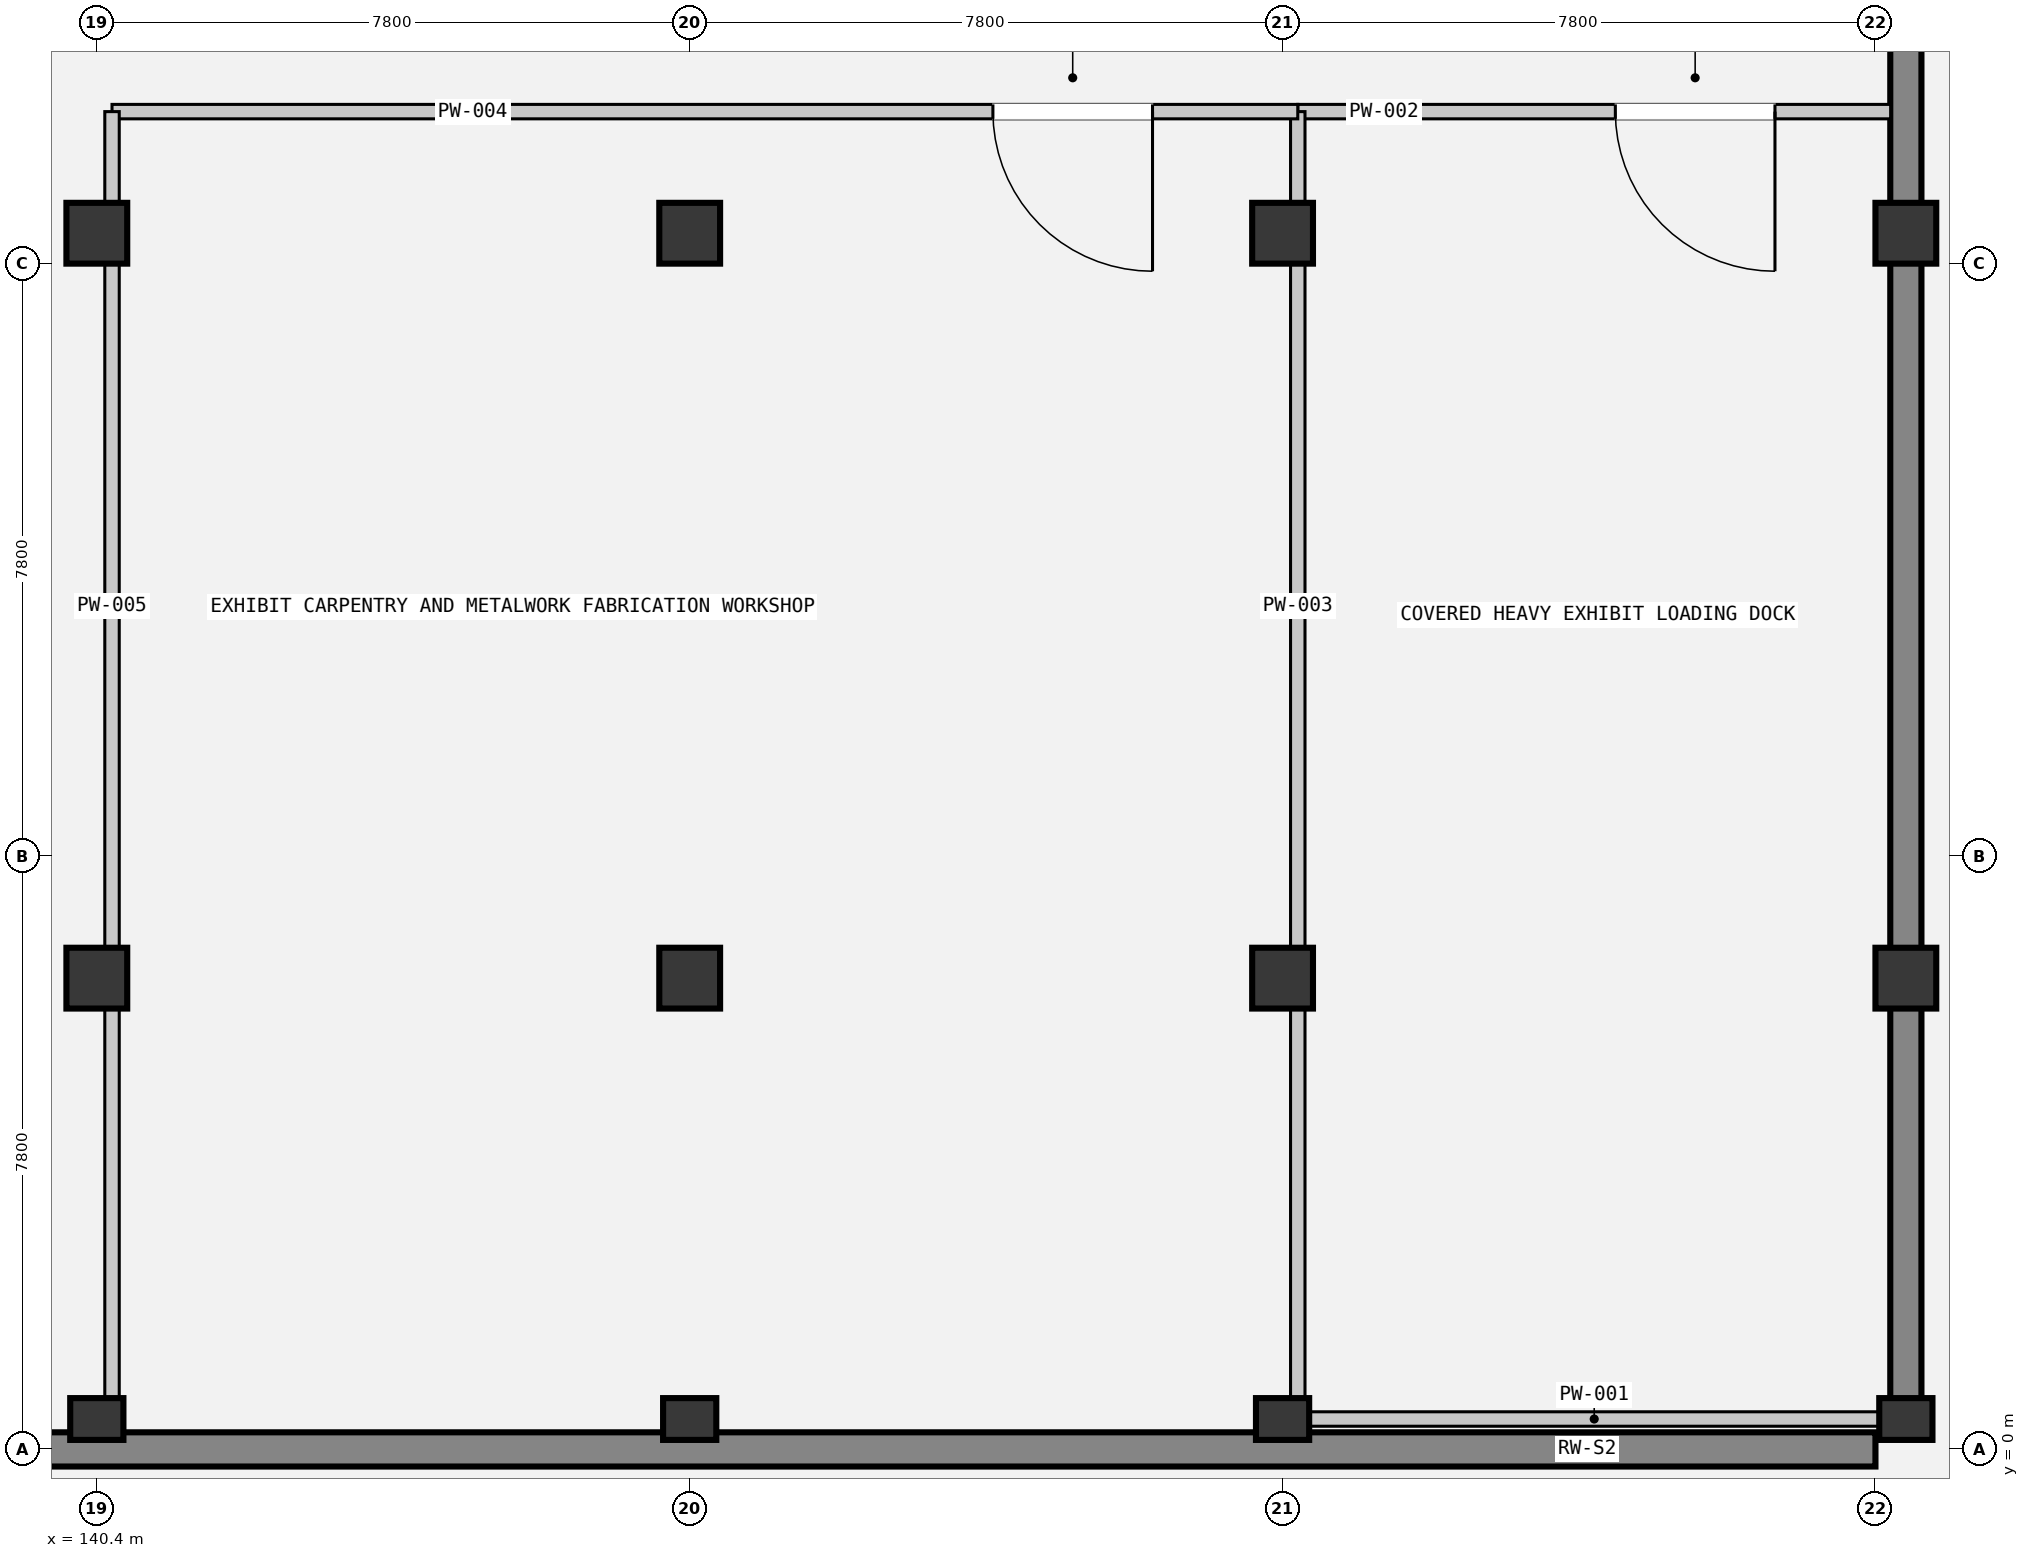
"""IFC4 building model, lengths in metres.
Left out: names, types, materials, properties, quantities, classifications, styles, units other than length and angle.
Written with IfcOpenShell. Run it as: python <this file> out.ifc"""

import sys

from ifc_helpers import new_model, si_unit, direction, frame, frame_2d, origin, origin_2d, place, context, subcontext, project, spatial, rectangle, extrude, element, fill, save


model = new_model("IFC4")
c1 = context("Model", 3, precision=1e-05, world=origin(), true_north=direction((0.0, 1.0)))
c2 = subcontext(c1, "Body", "Model", "MODEL_VIEW")
j1 = project(units=[si_unit("LENGTHUNIT", "METRE"), si_unit("PLANEANGLEUNIT", "RADIAN")], contexts=[c1])
p1 = place(None, origin())
s1 = spatial("IfcSite", under=j1, at=p1, CompositionType="ELEMENT")
p2 = place(p1, origin())
s2 = spatial("IfcBuilding", under=s1, at=p2, CompositionType="ELEMENT")
p3 = place(p2, frame((0.0, 0.0, -4.8)))
s3 = spatial("IfcBuildingStorey", under=s2, at=p3, CompositionType="ELEMENT", Elevation=-4.8)
p4 = place(p3, frame((140.4, 0.4, 0.0), z_axis=(0.0, 0.0, 1.0), x_axis=(1.0, 0.0, 0.0)))
e1 = element("IfcColumn", 1, at=p4, inside=s3, PredefinedType="COLUMN", context=c2, shape_type="SweptSolid", body=[
    extrude(rectangle(XDim=0.7, YDim=0.55, at=origin_2d()), origin(), (0.0, 0.0, 1.0), 4.8),
])
for number, where, z_axis, x_axis in (
    (2, (140.4, 6.2, 0.0), (0.0, 0.0, 1.0), (1.0, 0.0, 0.0)),
    (3, (140.4, 16.0, 0.0), (0.0, 0.0, 1.0), (1.0, 0.0, 0.0)),
):
    element("IfcColumn", number, at=place(p3, frame(where, z_axis=z_axis, x_axis=x_axis)), inside=s3, PredefinedType="COLUMN", context=c2, shape_type="SweptSolid", body=[
        extrude(rectangle(XDim=0.8, YDim=0.8, at=origin_2d()), origin(), (0.0, 0.0, 1.0), 4.8),
    ])
p5 = place(p3, frame((148.2, 0.4, 0.0), z_axis=(0.0, 0.0, 1.0), x_axis=(1.0, 0.0, 0.0)))
e4 = element("IfcColumn", 4, at=p5, inside=s3, PredefinedType="COLUMN", context=c2, shape_type="SweptSolid", body=[
    extrude(rectangle(XDim=0.7, YDim=0.55, at=origin_2d()), origin(), (0.0, 0.0, 1.0), 4.8),
])
for number, where, z_axis, x_axis in (
    (5, (148.2, 6.2, 0.0), (0.0, 0.0, 1.0), (1.0, 0.0, 0.0)),
    (6, (148.2, 16.0, 0.0), (0.0, 0.0, 1.0), (1.0, 0.0, 0.0)),
):
    element("IfcColumn", number, at=place(p3, frame(where, z_axis=z_axis, x_axis=x_axis)), inside=s3, PredefinedType="COLUMN", context=c2, shape_type="SweptSolid", body=[
        extrude(rectangle(XDim=0.8, YDim=0.8, at=origin_2d()), origin(), (0.0, 0.0, 1.0), 4.8),
    ])
p6 = place(p3, frame((156.0, 0.4, 0.0), z_axis=(0.0, 0.0, 1.0), x_axis=(1.0, 0.0, 0.0)))
e7 = element("IfcColumn", 7, at=p6, inside=s3, PredefinedType="COLUMN", context=c2, shape_type="SweptSolid", body=[
    extrude(rectangle(XDim=0.7, YDim=0.55, at=origin_2d()), origin(), (0.0, 0.0, 1.0), 4.8),
])
for number, where, z_axis, x_axis in (
    (8, (156.0, 6.2, 0.0), (0.0, 0.0, 1.0), (1.0, 0.0, 0.0)),
    (9, (156.0, 16.0, 0.0), (0.0, 0.0, 1.0), (1.0, 0.0, 0.0)),
):
    element("IfcColumn", number, at=place(p3, frame(where, z_axis=z_axis, x_axis=x_axis)), inside=s3, PredefinedType="COLUMN", context=c2, shape_type="SweptSolid", body=[
        extrude(rectangle(XDim=0.8, YDim=0.8, at=origin_2d()), origin(), (0.0, 0.0, 1.0), 4.8),
    ])
p7 = place(p3, frame((164.2, 0.4, 0.0), z_axis=(0.0, 0.0, 1.0), x_axis=(1.0, 0.0, 0.0)))
e10 = element("IfcColumn", 10, at=p7, inside=s3, PredefinedType="COLUMN", context=c2, shape_type="SweptSolid", body=[
    extrude(rectangle(XDim=0.7, YDim=0.55, at=origin_2d()), origin(), (0.0, 0.0, 1.0), 4.8),
])
for number, where, z_axis, x_axis in (
    (11, (164.2, 6.2, 0.0), (0.0, 0.0, 1.0), (1.0, 0.0, 0.0)),
    (12, (164.2, 16.0, 0.0), (0.0, 0.0, 1.0), (1.0, 0.0, 0.0)),
):
    element("IfcColumn", number, at=place(p3, frame(where, z_axis=z_axis, x_axis=x_axis)), inside=s3, PredefinedType="COLUMN", context=c2, shape_type="SweptSolid", body=[
        extrude(rectangle(XDim=0.8, YDim=0.8, at=origin_2d()), origin(), (0.0, 0.0, 1.0), 4.8),
    ])
p8 = place(p3, frame((117.4, 0.0, 0.0), z_axis=(0.0, 0.0, 1.0), x_axis=(1.0, 0.0, 0.0)))
e13 = element("IfcWall", 13, at=p8, inside=s3, PredefinedType="USERDEFINED", context=c2, shape_type="SweptSolid", body=[
    extrude(rectangle(XDim=46.4, YDim=0.45, at=frame_2d((23.2, 0.0))), origin(), (0.0, 0.0, 1.0), 4.52),
])
p9 = place(p3, frame((164.2, 0.4, 0.0), z_axis=(0.0, 0.0, 1.0), x_axis=(0.0, 1.0, 0.0)))
e14 = element("IfcWall", 14, at=p9, inside=s3, PredefinedType="USERDEFINED", context=c2, shape_type="SweptSolid", body=[
    extrude(rectangle(XDim=35.2, YDim=0.41, at=frame_2d((17.6, 0.0))), origin(), (0.0, 0.0, 1.0), 4.52),
])
p10 = place(p3, frame((156.2, 0.4, 0.0), z_axis=(0.0, 0.0, 1.0), x_axis=(1.0, 0.0, 0.0)))
e15 = element("IfcWall", 15, at=p10, inside=s3, PredefinedType="PARTITIONING", context=c2, shape_type="SweptSolid", body=[
    extrude(rectangle(XDim=7.8, YDim=0.19, at=frame_2d((3.9, 0.0))), origin(), (0.0, 0.0, 1.0), 3.45),
])
p11 = place(p3, frame((164.0, 17.6, 0.0), z_axis=(0.0, 0.0, 1.0), x_axis=(-1.0, 0.0, 0.0)))
e16 = element("IfcWall", 16, at=p11, inside=s3, PredefinedType="PARTITIONING", context=c2, shape_type="SweptSolid", body=[
    extrude(rectangle(XDim=7.8, YDim=0.19, at=frame_2d((3.9, 0.0))), origin(), (0.0, 0.0, 1.0), 3.45),
])
p12 = place(p11, frame((1.522, 0.0, 0.0)))
e17 = element("IfcOpeningElement", 17, at=p12, cuts=e16, PredefinedType="OPENING", context=c2, shape_type="SweptSolid", body=[
    extrude(rectangle(XDim=2.1, YDim=2.6, at=frame_2d((1.05, 1.3))), frame((0.0, 0.105, 0.0), z_axis=(0.0, -1.0, 0.0), x_axis=(1.0, 0.0, 0.0)), (0.0, 0.0, 1.0), 0.21),
])
p13 = place(p3, frame((156.2, 17.6, 0.0), z_axis=(0.0, 0.0, 1.0), x_axis=(0.0, -1.0, 0.0)))
e18 = element("IfcWall", 18, at=p13, inside=s3, PredefinedType="PARTITIONING", context=c2, shape_type="SweptSolid", body=[
    extrude(rectangle(XDim=17.2, YDim=0.19, at=frame_2d((8.6, 0.0))), origin(), (0.0, 0.0, 1.0), 3.45),
])
p14 = place(p3, frame((156.2, 17.6, 0.0), z_axis=(0.0, 0.0, 1.0), x_axis=(-1.0, 0.0, 0.0)))
e19 = element("IfcWall", 19, at=p14, inside=s3, PredefinedType="PARTITIONING", context=c2, shape_type="SweptSolid", body=[
    extrude(rectangle(XDim=15.6, YDim=0.19, at=frame_2d((7.8, 0.0))), origin(), (0.0, 0.0, 1.0), 3.45),
])
p15 = place(p14, frame((1.911, 0.0, 0.0)))
e20 = element("IfcOpeningElement", 20, at=p15, cuts=e19, PredefinedType="OPENING", context=c2, shape_type="SweptSolid", body=[
    extrude(rectangle(XDim=2.1, YDim=2.6, at=frame_2d((1.05, 1.3))), frame((0.0, 0.105, 0.0), z_axis=(0.0, -1.0, 0.0), x_axis=(1.0, 0.0, 0.0)), (0.0, 0.0, 1.0), 0.21),
])
p16 = place(p3, frame((140.6, 17.6, 0.0), z_axis=(0.0, 0.0, 1.0), x_axis=(0.0, -1.0, 0.0)))
e21 = element("IfcWall", 21, at=p16, inside=s3, PredefinedType="PARTITIONING", context=c2, shape_type="SweptSolid", body=[
    extrude(rectangle(XDim=17.2, YDim=0.19, at=frame_2d((8.6, 0.0))), origin(), (0.0, 0.0, 1.0), 3.45),
])
p17 = place(p12, origin())
e22 = element("IfcDoor", 22, at=p17, inside=s3, OperationType="DOUBLE_DOOR_SINGLE_SWING", PredefinedType="DOOR", context=c2, shape_type="SweptSolid", body=[
    extrude(rectangle(XDim=2.1, YDim=2.6, at=frame_2d((1.05, 1.3))), frame((0.0, 0.025, 0.0), z_axis=(0.0, -1.0, 0.0), x_axis=(1.0, 0.0, 0.0)), (0.0, 0.0, 1.0), 0.05),
])
fill(e17, e22)
p18 = place(p15, origin())
e23 = element("IfcDoor", 23, at=p18, inside=s3, OperationType="DOUBLE_DOOR_SINGLE_SWING", PredefinedType="DOOR", context=c2, shape_type="SweptSolid", body=[
    extrude(rectangle(XDim=2.1, YDim=2.6, at=frame_2d((1.05, 1.3))), frame((0.0, 0.025, 0.0), z_axis=(0.0, -1.0, 0.0), x_axis=(1.0, 0.0, 0.0)), (0.0, 0.0, 1.0), 0.05),
])
fill(e20, e23)
save(model, sys.argv[1])
